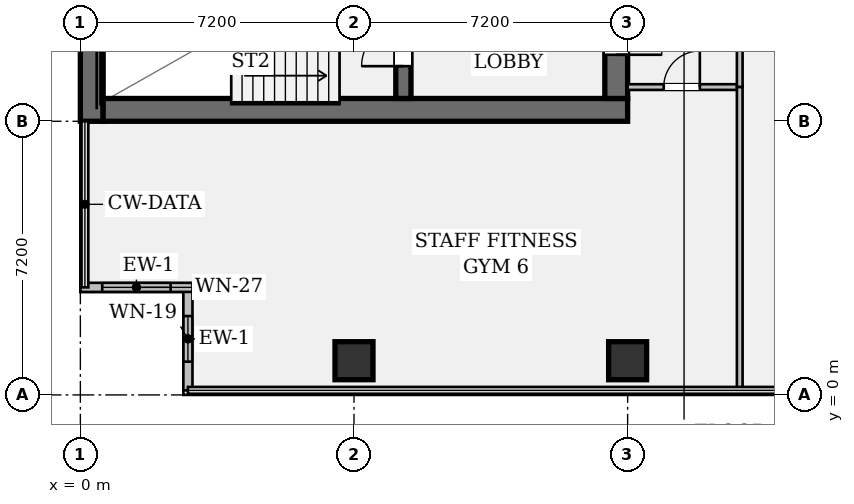
"""IFC4 building model, lengths in metres.
Left out: names, types, materials, properties, quantities, classifications, styles, units other than length and angle.
Written with IfcOpenShell. Run it as: python <this file> out.ifc"""

import sys

from ifc_helpers import new_model, si_unit, direction, frame, frame_2d, origin, origin_2d, place, context, subcontext, project, spatial, rectangle, hollow_rectangle, extrude, element, fill, save


model = new_model("IFC4")
c1 = context("Model", 3, precision=1e-05, world=origin(), true_north=direction((0.0, 1.0)))
c2 = subcontext(c1, "Body", "Model", "MODEL_VIEW")
j1 = project(units=[si_unit("LENGTHUNIT", "METRE"), si_unit("PLANEANGLEUNIT", "RADIAN")], contexts=[c1])
p1 = place(None, origin())
s1 = spatial("IfcSite", under=j1, at=p1, CompositionType="ELEMENT")
p2 = place(p1, origin())
s2 = spatial("IfcBuilding", under=s1, at=p2, CompositionType="ELEMENT")
p3 = place(p2, frame((0.0, 0.0, 65.8)))
s3 = spatial("IfcBuildingStorey", under=s2, at=p3, CompositionType="ELEMENT", Elevation=65.8)
p4 = place(p3, frame((0.3, 7.2, 0.0), z_axis=(0.0, 0.0, 1.0), x_axis=(0.0, 1.0, 0.0)))
e1 = element("IfcWall", 1, at=p4, inside=s3, PredefinedType="SHEAR", context=c2, shape_type="SweptSolid", body=[
    extrude(rectangle(XDim=28.8, YDim=0.6, at=frame_2d((14.4, 0.0))), origin(), (0.0, 0.0, 1.0), 3.57),
])
p5 = place(p3, frame((0.6, 7.5, 0.0), z_axis=(0.0, 0.0, 1.0), x_axis=(1.0, 0.0, 0.0)))
e2 = element("IfcWall", 2, at=p5, inside=s3, PredefinedType="SHEAR", context=c2, shape_type="SweptSolid", body=[
    extrude(rectangle(XDim=13.8, YDim=0.6, at=frame_2d((6.9, 0.0))), origin(), (0.0, 0.0, 1.0), 3.57),
])
p6 = place(p3, frame((14.1, 35.4, 0.0), z_axis=(0.0, 0.0, 1.0), x_axis=(0.0, -1.0, 0.0)))
e3 = element("IfcWall", 3, at=p6, inside=s3, PredefinedType="SHEAR", context=c2, shape_type="SweptSolid", body=[
    extrude(rectangle(XDim=27.6, YDim=0.6, at=frame_2d((13.8, 0.0))), origin(), (0.0, 0.0, 1.0), 3.57),
])
p7 = place(p6, frame((1.3, 0.0, 0.0)))
e4 = element("IfcOpeningElement", 4, at=p7, cuts=e3, PredefinedType="OPENING", context=c2, shape_type="SweptSolid", body=[
    extrude(rectangle(XDim=1.2, YDim=2.15, at=frame_2d((0.6, 1.075))), frame((0.0, 0.312, 0.0), z_axis=(0.0, -1.0, 0.0), x_axis=(1.0, 0.0, 0.0)), (0.0, 0.0, 1.0), 0.624),
])
p8 = place(p6, frame((25.25, 0.0, 0.0)))
e5 = element("IfcOpeningElement", 5, at=p8, cuts=e3, PredefinedType="OPENING", context=c2, shape_type="SweptSolid", body=[
    extrude(rectangle(XDim=1.2, YDim=2.15, at=frame_2d((0.6, 1.075))), frame((0.0, 0.312, 0.0), z_axis=(0.0, -1.0, 0.0), x_axis=(1.0, 0.0, 0.0)), (0.0, 0.0, 1.0), 0.624),
])
p9 = place(p6, frame((14.6, 0.0, 0.0)))
e6 = element("IfcOpeningElement", 6, at=p9, cuts=e3, PredefinedType="OPENING", context=c2, shape_type="SweptSolid", body=[
    extrude(rectangle(XDim=1.6, YDim=2.2, at=frame_2d((0.8, 1.1))), frame((0.0, 0.312, 0.0), z_axis=(0.0, -1.0, 0.0), x_axis=(1.0, 0.0, 0.0)), (0.0, 0.0, 1.0), 0.624),
])
p10 = place(p3, frame((8.5, 7.8, 0.0), z_axis=(0.0, 0.0, 1.0), x_axis=(0.0, 1.0, 0.0)))
e7 = element("IfcWall", 7, at=p10, inside=s3, PredefinedType="SHEAR", context=c2, shape_type="SweptSolid", body=[
    extrude(rectangle(XDim=3.68, YDim=0.4, at=frame_2d((1.84, 0.0))), origin(), (0.0, 0.0, 1.0), 3.57),
])
p11 = place(p10, frame((0.85, 0.0, 0.0)))
e8 = element("IfcOpeningElement", 8, at=p11, cuts=e7, PredefinedType="OPENING", context=c2, shape_type="SweptSolid", body=[
    extrude(rectangle(XDim=1.1, YDim=2.15, at=frame_2d((0.55, 1.075))), frame((0.0, 0.212, 0.0), z_axis=(0.0, -1.0, 0.0), x_axis=(1.0, 0.0, 0.0)), (0.0, 0.0, 1.0), 0.424),
])
for number, where, z_axis, x_axis in (
    (9, (7.2, 0.9, 0.0), (0.0, 0.0, 1.0), (1.0, 0.0, 0.0)),
    (10, (14.4, 0.9, 0.0), (0.0, 0.0, 1.0), (1.0, 0.0, 0.0)),
):
    element("IfcColumn", number, at=place(p3, frame(where, z_axis=z_axis, x_axis=x_axis)), inside=s3, PredefinedType="COLUMN", context=c2, shape_type="SweptSolid", body=[
        extrude(hollow_rectangle(XDim=1.0, YDim=1.0, WallThickness=0.065, at=origin_2d()), origin(), (0.0, 0.0, 1.0), 3.57),
    ])
p12 = place(p3, frame((2.83, 0.12, 0.0), z_axis=(0.0, 0.0, 1.0), x_axis=(0.0, 1.0, 0.0)))
e11 = element("IfcWall", 11, at=p12, inside=s3, PredefinedType="STANDARD", context=c2, shape_type="SweptSolid", body=[
    extrude(rectangle(XDim=2.71, YDim=0.24, at=frame_2d((1.355, 0.0))), origin(), (0.0, 0.0, 1.0), 3.57),
])
p13 = place(p12, frame((0.755, 0.0, 0.95)))
e12 = element("IfcOpeningElement", 12, at=p13, cuts=e11, PredefinedType="OPENING", context=c2, shape_type="SweptSolid", body=[
    extrude(rectangle(XDim=1.2, YDim=1.8, at=frame_2d((0.6, 0.9))), frame((0.0, 0.132, 0.0), z_axis=(0.0, -1.0, 0.0), x_axis=(1.0, 0.0, 0.0)), (0.0, 0.0, 1.0), 0.264),
])
p14 = place(p3, frame((2.95, 2.83, 0.0), z_axis=(0.0, 0.0, 1.0), x_axis=(-1.0, 0.0, 0.0)))
e13 = element("IfcWall", 13, at=p14, inside=s3, PredefinedType="STANDARD", context=c2, shape_type="SweptSolid", body=[
    extrude(rectangle(XDim=2.95, YDim=0.24, at=frame_2d((1.475, 0.0))), origin(), (0.0, 0.0, 1.0), 3.57),
])
p15 = place(p14, frame((0.575, 0.0, 0.95)))
e14 = element("IfcOpeningElement", 14, at=p15, cuts=e13, PredefinedType="OPENING", context=c2, shape_type="SweptSolid", body=[
    extrude(rectangle(XDim=1.8, YDim=1.35, at=frame_2d((0.9, 0.675))), frame((0.0, 0.132, 0.0), z_axis=(0.0, -1.0, 0.0), x_axis=(1.0, 0.0, 0.0)), (0.0, 0.0, 1.0), 0.264),
])
p16 = place(p3, frame((14.4, 8.1, 0.0), z_axis=(0.0, 0.0, 1.0), x_axis=(1.0, 0.0, 0.0)))
e15 = element("IfcWall", 15, at=p16, inside=s3, PredefinedType="PARTITIONING", context=c2, shape_type="SweptSolid", body=[
    extrude(rectangle(XDim=2.95, YDim=0.15, at=frame_2d((1.475, 0.0))), origin(), (0.0, 0.0, 1.0), 3.088),
])
p17 = place(p16, frame((0.95, 0.0, 0.0)))
e16 = element("IfcOpeningElement", 16, at=p17, cuts=e15, PredefinedType="OPENING", context=c2, shape_type="SweptSolid", body=[
    extrude(rectangle(XDim=0.95, YDim=2.15, at=frame_2d((0.475, 1.075))), frame((0.0, 0.087, 0.0), z_axis=(0.0, -1.0, 0.0), x_axis=(1.0, 0.0, 0.0)), (0.0, 0.0, 1.0), 0.174),
])
p18 = place(p3, frame((17.35, 8.1, 0.0), z_axis=(0.0, 0.0, 1.0), x_axis=(0.0, 1.0, 0.0)))
e17 = element("IfcWall", 17, at=p18, inside=s3, PredefinedType="PARTITIONING", context=c2, shape_type="SweptSolid", body=[
    extrude(rectangle(XDim=3.2, YDim=0.15, at=frame_2d((1.6, 0.0))), origin(), (0.0, 0.0, 1.0), 3.57),
])
p19 = place(p3, frame((17.35, 0.12, 0.0), z_axis=(0.0, 0.0, 1.0), x_axis=(0.0, 1.0, 0.0)))
e18 = element("IfcWall", 18, at=p19, inside=s3, PredefinedType="PARTITIONING", context=c2, shape_type="SweptSolid", body=[
    extrude(rectangle(XDim=7.98, YDim=0.15, at=frame_2d((3.99, 0.0))), origin(), (0.0, 0.0, 1.0), 2.699),
])
p20 = place(p13, origin())
e19 = element("IfcWindow", 19, at=p20, inside=s3, PartitioningType="SINGLE_PANEL", PredefinedType="WINDOW", context=c2, shape_type="SweptSolid", body=[
    extrude(rectangle(XDim=1.2, YDim=1.8, at=frame_2d((0.6, 0.9))), frame((0.0, 0.03, 0.0), z_axis=(0.0, -1.0, 0.0), x_axis=(1.0, 0.0, 0.0)), (0.0, 0.0, 1.0), 0.06),
])
fill(e12, e19)
p21 = place(p15, origin())
e20 = element("IfcWindow", 20, at=p21, inside=s3, PartitioningType="SINGLE_PANEL", PredefinedType="WINDOW", context=c2, shape_type="SweptSolid", body=[
    extrude(rectangle(XDim=1.8, YDim=1.35, at=frame_2d((0.9, 0.675))), frame((0.0, 0.03, 0.0), z_axis=(0.0, -1.0, 0.0), x_axis=(1.0, 0.0, 0.0)), (0.0, 0.0, 1.0), 0.06),
])
fill(e14, e20)
p22 = place(p11, origin())
e21 = element("IfcDoor", 21, at=p22, inside=s3, OperationType="SINGLE_SWING_LEFT", PredefinedType="DOOR", context=c2, shape_type="SweptSolid", body=[
    extrude(rectangle(XDim=1.1, YDim=2.15, at=frame_2d((0.55, 1.075))), frame((0.0, 0.025, 0.0), z_axis=(0.0, -1.0, 0.0), x_axis=(1.0, 0.0, 0.0)), (0.0, 0.0, 1.0), 0.05),
])
fill(e8, e21)
p23 = place(p8, origin())
e22 = element("IfcDoor", 22, at=p23, inside=s3, OperationType="SINGLE_SWING_RIGHT", PredefinedType="DOOR", context=c2, shape_type="SweptSolid", body=[
    extrude(rectangle(XDim=1.2, YDim=2.15, at=frame_2d((0.6, 1.075))), frame((0.0, 0.025, 0.0), z_axis=(0.0, -1.0, 0.0), x_axis=(1.0, 0.0, 0.0)), (0.0, 0.0, 1.0), 0.05),
])
fill(e5, e22)
p24 = place(p17, origin())
e23 = element("IfcDoor", 23, at=p24, inside=s3, OperationType="SINGLE_SWING_RIGHT", PredefinedType="DOOR", context=c2, shape_type="SweptSolid", body=[
    extrude(rectangle(XDim=0.95, YDim=2.15, at=frame_2d((0.475, 1.075))), frame((0.0, 0.025, 0.0), z_axis=(0.0, -1.0, 0.0), x_axis=(1.0, 0.0, 0.0)), (0.0, 0.0, 1.0), 0.05),
])
fill(e16, e23)
save(model, sys.argv[1])
